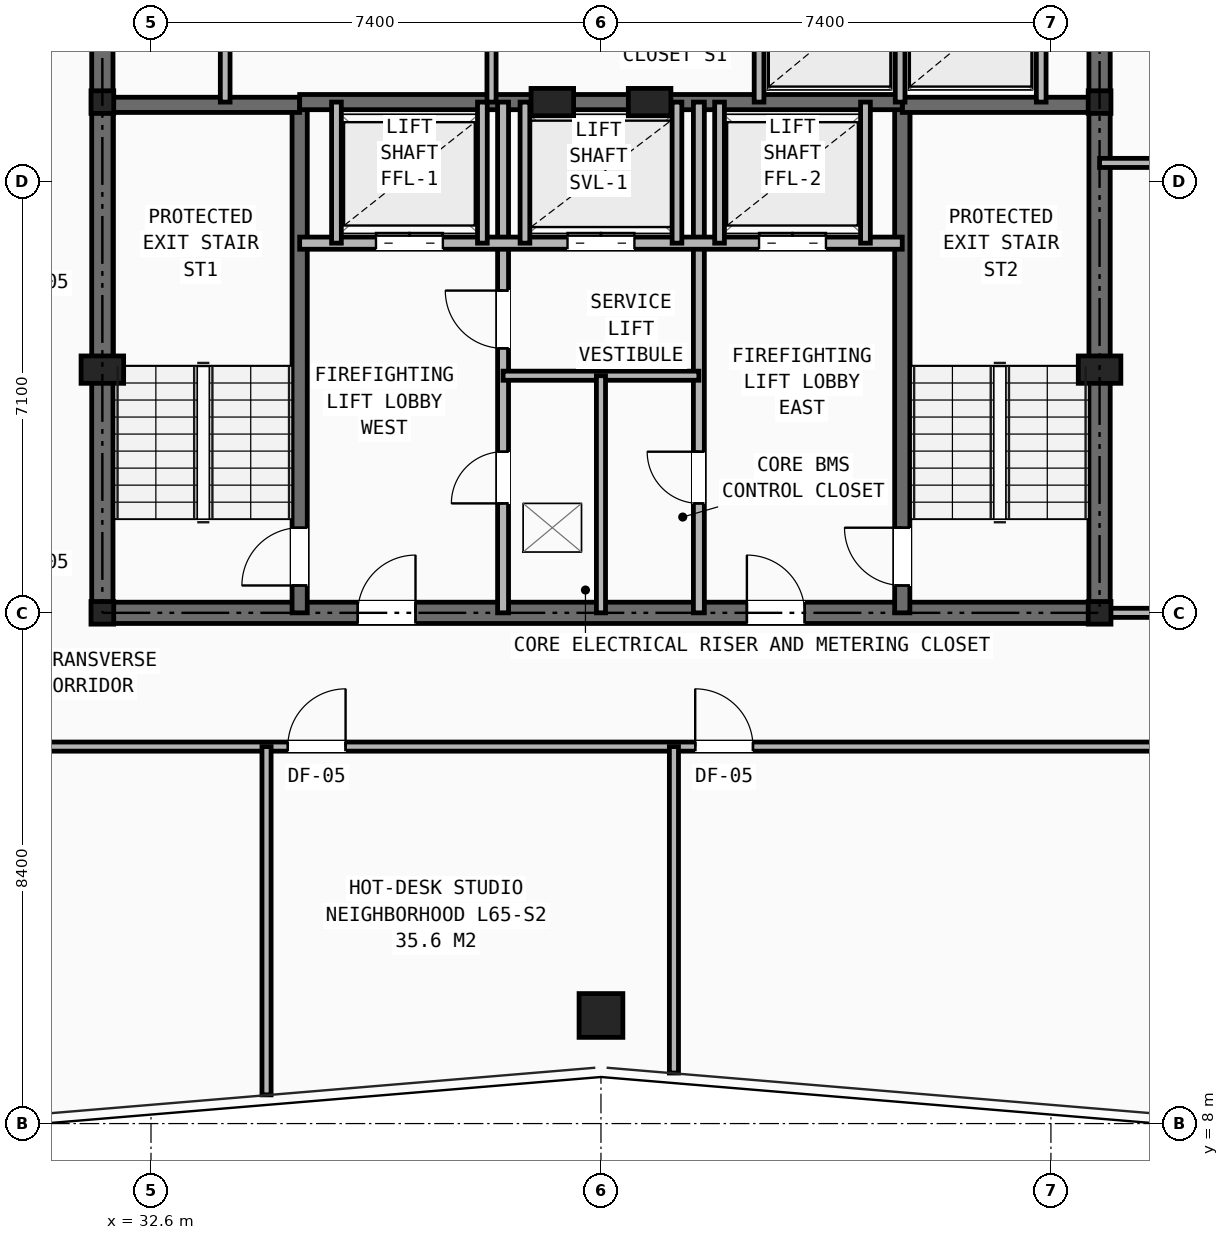
"""IFC4 building model, lengths in metres.
Left out: names, types, materials, properties, quantities, classifications, styles, units other than length and angle.
Written with IfcOpenShell. Run it as: python <this file> out.ifc"""

import sys

from ifc_helpers import new_model, si_unit, direction, frame, frame_2d, origin, origin_2d, place, context, subcontext, project, spatial, rectangle, hollow_rectangle, i_section, extrude, element, fill, save


model = new_model("IFC4")
c1 = context("Model", 3, precision=1e-05, world=origin(), true_north=direction((0.0, 1.0)))
c2 = subcontext(c1, "Body", "Model", "MODEL_VIEW")
j1 = project(units=[si_unit("LENGTHUNIT", "METRE"), si_unit("PLANEANGLEUNIT", "RADIAN")], contexts=[c1])
p1 = place(None, origin())
s1 = spatial("IfcSite", under=j1, at=p1, CompositionType="ELEMENT")
p2 = place(p1, origin())
s2 = spatial("IfcBuilding", under=s1, at=p2, CompositionType="ELEMENT")
p3 = place(p2, frame((0.0, 0.0, 229.4)))
s3 = spatial("IfcBuildingStorey", under=s2, at=p3, CompositionType="ELEMENT", Elevation=229.4)
for number, where, z_axis, x_axis in (
    (1, (31.8, 16.4, 0.0), (0.0, 0.0, 1.0), (1.0, 0.0, 0.0)),
    (2, (48.2, 16.4, 0.0), (0.0, 0.0, 1.0), (1.0, 0.0, 0.0)),
    (3, (31.8, 24.8, 0.0), (0.0, 0.0, 1.0), (1.0, 0.0, 0.0)),
    (4, (48.2, 24.8, 0.0), (0.0, 0.0, 1.0), (1.0, 0.0, 0.0)),
):
    element("IfcColumn", number, at=place(p3, frame(where, z_axis=z_axis, x_axis=x_axis)), inside=s3, PredefinedType="COLUMN", context=c2, shape_type="SweptSolid", body=[
        extrude(i_section(OverallWidth=0.374, OverallDepth=0.372, WebThickness=0.016, FlangeThickness=0.026, at=origin_2d()), origin(), (0.0, 0.0, 1.0), 3.5),
    ])
for number, where, z_axis, x_axis in (
    (5, (31.8, 20.4, 0.0), (0.0, 0.0, 1.0), (1.0, 0.0, 0.0)),
    (6, (48.2, 20.4, 0.0), (0.0, 0.0, 1.0), (1.0, 0.0, 0.0)),
    (7, (39.2, 24.8, 0.0), (0.0, 0.0, 1.0), (1.0, 0.0, 0.0)),
    (8, (40.8, 24.8, 0.0), (0.0, 0.0, 1.0), (1.0, 0.0, 0.0)),
):
    element("IfcColumn", number, at=place(p3, frame(where, z_axis=z_axis, x_axis=x_axis)), inside=s3, PredefinedType="PILASTER", context=c2, shape_type="SweptSolid", body=[
        extrude(rectangle(XDim=0.7, YDim=0.45, at=origin_2d()), origin(), (0.0, 0.0, 1.0), 3.5),
    ])
p4 = place(p3, frame((40.0, 9.778, 0.0), z_axis=(0.0, 0.0, 1.0), x_axis=(1.0, 0.0, 0.0)))
e9 = element("IfcColumn", 9, at=p4, inside=s3, PredefinedType="COLUMN", context=c2, shape_type="SweptSolid", body=[
    extrude(hollow_rectangle(XDim=0.72, YDim=0.72, WallThickness=0.05, at=origin_2d()), origin(), (0.0, 0.0, 1.0), 3.5),
])
p5 = place(p3, frame((31.8, 16.4, 0.0), z_axis=(0.0, 0.0, 1.0), x_axis=(1.0, 0.0, 0.0)))
e10 = element("IfcWall", 10, at=p5, inside=s3, PredefinedType="SHEAR", context=c2, shape_type="SweptSolid", body=[
    extrude(rectangle(XDim=16.4, YDim=0.35, at=frame_2d((8.2, 0.0))), origin(), (0.0, 0.0, 1.0), 3.25),
])
p6 = place(p5, frame((4.2, 0.0, 0.0)))
e11 = element("IfcOpeningElement", 11, at=p6, cuts=e10, PredefinedType="OPENING", context=c2, shape_type="SweptSolid", body=[
    extrude(rectangle(XDim=0.95, YDim=2.1, at=frame_2d((0.475, 1.05))), frame((0.0, 0.185, 0.0), z_axis=(0.0, -1.0, 0.0), x_axis=(1.0, 0.0, 0.0)), (0.0, 0.0, 1.0), 0.37),
])
p7 = place(p5, frame((10.6, 0.0, 0.0)))
e12 = element("IfcOpeningElement", 12, at=p7, cuts=e10, PredefinedType="OPENING", context=c2, shape_type="SweptSolid", body=[
    extrude(rectangle(XDim=0.95, YDim=2.1, at=frame_2d((0.475, 1.05))), frame((0.0, 0.185, 0.0), z_axis=(0.0, -1.0, 0.0), x_axis=(1.0, 0.0, 0.0)), (0.0, 0.0, 1.0), 0.37),
])
p8 = place(p3, frame((31.8, 16.4, 0.0), z_axis=(0.0, 0.0, 1.0), x_axis=(0.0, 1.0, 0.0)))
e13 = element("IfcWall", 13, at=p8, inside=s3, PredefinedType="SHEAR", context=c2, shape_type="SweptSolid", body=[
    extrude(rectangle(XDim=14.8, YDim=0.35, at=frame_2d((7.4, 0.0))), origin(), (0.0, 0.0, 1.0), 3.25),
])
p9 = place(p8, frame((11.0, 0.0, 0.0)))
e14 = element("IfcOpeningElement", 14, at=p9, cuts=e13, PredefinedType="OPENING", context=c2, shape_type="SweptSolid", body=[
    extrude(rectangle(XDim=1.1, YDim=2.15, at=frame_2d((0.55, 1.075))), frame((0.0, 0.185, 0.0), z_axis=(0.0, -1.0, 0.0), x_axis=(1.0, 0.0, 0.0)), (0.0, 0.0, 1.0), 0.37),
])
p10 = place(p3, frame((48.2, 16.4, 0.0), z_axis=(0.0, 0.0, 1.0), x_axis=(0.0, 1.0, 0.0)))
e15 = element("IfcWall", 15, at=p10, inside=s3, PredefinedType="SHEAR", context=c2, shape_type="SweptSolid", body=[
    extrude(rectangle(XDim=14.8, YDim=0.35, at=frame_2d((7.4, 0.0))), origin(), (0.0, 0.0, 1.0), 3.25),
])
p11 = place(p10, frame((11.0, 0.0, 0.0)))
e16 = element("IfcOpeningElement", 16, at=p11, cuts=e15, PredefinedType="OPENING", context=c2, shape_type="SweptSolid", body=[
    extrude(rectangle(XDim=1.1, YDim=2.15, at=frame_2d((0.55, 1.075))), frame((0.0, 0.185, 0.0), z_axis=(0.0, -1.0, 0.0), x_axis=(1.0, 0.0, 0.0)), (0.0, 0.0, 1.0), 0.37),
])
p12 = place(p3, frame((35.045, 16.4, 0.0), z_axis=(0.0, 0.0, 1.0), x_axis=(0.0, 1.0, 0.0)))
e17 = element("IfcWall", 17, at=p12, inside=s3, PredefinedType="SHEAR", context=c2, shape_type="SweptSolid", body=[
    extrude(rectangle(XDim=8.4, YDim=0.25, at=frame_2d((4.2, 0.0))), origin(), (0.0, 0.0, 1.0), 3.25),
])
p13 = place(p12, frame((0.45, 0.0, 0.0)))
e18 = element("IfcOpeningElement", 18, at=p13, cuts=e17, PredefinedType="OPENING", context=c2, shape_type="SweptSolid", body=[
    extrude(rectangle(XDim=0.95, YDim=2.1, at=frame_2d((0.475, 1.05))), frame((0.0, 0.135, 0.0), z_axis=(0.0, -1.0, 0.0), x_axis=(1.0, 0.0, 0.0)), (0.0, 0.0, 1.0), 0.27),
])
p14 = place(p3, frame((31.8, 24.755, 0.0), z_axis=(0.0, 0.0, 1.0), x_axis=(1.0, 0.0, 0.0)))
e19 = element("IfcWall", 19, at=p14, inside=s3, PredefinedType="SHEAR", context=c2, shape_type="SweptSolid", body=[
    extrude(rectangle(XDim=3.245, YDim=0.25, at=frame_2d((1.623, 0.0))), origin(), (0.0, 0.0, 1.0), 3.25),
])
p15 = place(p3, frame((44.955, 16.4, 0.0), z_axis=(0.0, 0.0, 1.0), x_axis=(0.0, 1.0, 0.0)))
e20 = element("IfcWall", 20, at=p15, inside=s3, PredefinedType="SHEAR", context=c2, shape_type="SweptSolid", body=[
    extrude(rectangle(XDim=8.4, YDim=0.25, at=frame_2d((4.2, 0.0))), origin(), (0.0, 0.0, 1.0), 3.25),
])
p16 = place(p15, frame((0.45, 0.0, 0.0)))
e21 = element("IfcOpeningElement", 21, at=p16, cuts=e20, PredefinedType="OPENING", context=c2, shape_type="SweptSolid", body=[
    extrude(rectangle(XDim=0.95, YDim=2.1, at=frame_2d((0.475, 1.05))), frame((0.0, 0.135, 0.0), z_axis=(0.0, -1.0, 0.0), x_axis=(1.0, 0.0, 0.0)), (0.0, 0.0, 1.0), 0.27),
])
p17 = place(p3, frame((44.955, 24.755, 0.0), z_axis=(0.0, 0.0, 1.0), x_axis=(1.0, 0.0, 0.0)))
e22 = element("IfcWall", 22, at=p17, inside=s3, PredefinedType="SHEAR", context=c2, shape_type="SweptSolid", body=[
    extrude(rectangle(XDim=3.245, YDim=0.25, at=frame_2d((1.623, 0.0))), origin(), (0.0, 0.0, 1.0), 3.25),
])
p18 = place(p3, frame((35.045, 24.8, 0.0), z_axis=(0.0, 0.0, 1.0), x_axis=(1.0, 0.0, 0.0)))
e23 = element("IfcWall", 23, at=p18, inside=s3, PredefinedType="SHEAR", context=c2, shape_type="SweptSolid", body=[
    extrude(rectangle(XDim=9.91, YDim=0.25, at=frame_2d((4.955, 0.0))), origin(), (0.0, 0.0, 1.0), 3.25),
])
p19 = place(p3, frame((38.39, 16.4, 0.0), z_axis=(0.0, 0.0, 1.0), x_axis=(0.0, 1.0, 0.0)))
e24 = element("IfcWall", 24, at=p19, inside=s3, PredefinedType="PARTITIONING", context=c2, shape_type="SweptSolid", body=[
    extrude(rectangle(XDim=8.4, YDim=0.18, at=frame_2d((4.2, 0.0))), origin(), (0.0, 0.0, 1.0), 2.978),
])
p20 = place(p19, frame((1.8, 0.0, 0.0)))
e25 = element("IfcOpeningElement", 25, at=p20, cuts=e24, PredefinedType="OPENING", context=c2, shape_type="SweptSolid", body=[
    extrude(rectangle(XDim=0.85, YDim=2.05, at=frame_2d((0.425, 1.025))), frame((0.0, 0.1, 0.0), z_axis=(0.0, -1.0, 0.0), x_axis=(1.0, 0.0, 0.0)), (0.0, 0.0, 1.0), 0.2),
])
p21 = place(p19, frame((4.35, 0.0, 0.0)))
e26 = element("IfcOpeningElement", 26, at=p21, cuts=e24, PredefinedType="OPENING", context=c2, shape_type="SweptSolid", body=[
    extrude(rectangle(XDim=0.95, YDim=2.1, at=frame_2d((0.475, 1.05))), frame((0.0, 0.1, 0.0), z_axis=(0.0, -1.0, 0.0), x_axis=(1.0, 0.0, 0.0)), (0.0, 0.0, 1.0), 0.2),
])
p22 = place(p3, frame((41.61, 16.4, 0.0), z_axis=(0.0, 0.0, 1.0), x_axis=(0.0, 1.0, 0.0)))
e27 = element("IfcWall", 27, at=p22, inside=s3, PredefinedType="PARTITIONING", context=c2, shape_type="SweptSolid", body=[
    extrude(rectangle(XDim=8.4, YDim=0.18, at=frame_2d((4.2, 0.0))), origin(), (0.0, 0.0, 1.0), 2.978),
])
p23 = place(p22, frame((1.8, 0.0, 0.0)))
e28 = element("IfcOpeningElement", 28, at=p23, cuts=e27, PredefinedType="OPENING", context=c2, shape_type="SweptSolid", body=[
    extrude(rectangle(XDim=0.85, YDim=2.05, at=frame_2d((0.425, 1.025))), frame((0.0, 0.1, 0.0), z_axis=(0.0, -1.0, 0.0), x_axis=(1.0, 0.0, 0.0)), (0.0, 0.0, 1.0), 0.2),
])
p24 = place(p3, frame((35.045, 22.48, 0.0), z_axis=(0.0, 0.0, 1.0), x_axis=(1.0, 0.0, 0.0)))
e29 = element("IfcWall", 29, at=p24, inside=s3, PredefinedType="SOLIDWALL", context=c2, shape_type="SweptSolid", body=[
    extrude(rectangle(XDim=9.91, YDim=0.2, at=frame_2d((4.955, 0.0))), origin(), (0.0, 0.0, 1.0), 3.25),
])
p25 = place(p24, frame((1.255, 0.0, 0.0)))
e30 = element("IfcOpeningElement", 30, at=p25, cuts=e29, PredefinedType="OPENING", context=c2, shape_type="SweptSolid", body=[
    extrude(rectangle(XDim=1.1, YDim=2.15, at=frame_2d((0.55, 1.075))), frame((0.0, 0.11, 0.0), z_axis=(0.0, -1.0, 0.0), x_axis=(1.0, 0.0, 0.0)), (0.0, 0.0, 1.0), 0.22),
])
p26 = place(p24, frame((7.555, 0.0, 0.0)))
e31 = element("IfcOpeningElement", 31, at=p26, cuts=e29, PredefinedType="OPENING", context=c2, shape_type="SweptSolid", body=[
    extrude(rectangle(XDim=1.1, YDim=2.15, at=frame_2d((0.55, 1.075))), frame((0.0, 0.11, 0.0), z_axis=(0.0, -1.0, 0.0), x_axis=(1.0, 0.0, 0.0)), (0.0, 0.0, 1.0), 0.22),
])
p27 = place(p24, frame((4.405, 0.0, 0.0)))
e32 = element("IfcOpeningElement", 32, at=p27, cuts=e29, PredefinedType="OPENING", context=c2, shape_type="SweptSolid", body=[
    extrude(rectangle(XDim=1.1, YDim=2.15, at=frame_2d((0.55, 1.075))), frame((0.0, 0.11, 0.0), z_axis=(0.0, -1.0, 0.0), x_axis=(1.0, 0.0, 0.0)), (0.0, 0.0, 1.0), 0.22),
])
p28 = place(p3, frame((38.39, 20.3, 0.0), z_axis=(0.0, 0.0, 1.0), x_axis=(1.0, 0.0, 0.0)))
e33 = element("IfcWall", 33, at=p28, inside=s3, PredefinedType="PARTITIONING", context=c2, shape_type="SweptSolid", body=[
    extrude(rectangle(XDim=3.22, YDim=0.15, at=frame_2d((1.61, 0.0))), origin(), (0.0, 0.0, 1.0), 3.25),
])
p29 = place(p3, frame((40.0, 16.4, 0.0), z_axis=(0.0, 0.0, 1.0), x_axis=(0.0, 1.0, 0.0)))
e34 = element("IfcWall", 34, at=p29, inside=s3, PredefinedType="PARTITIONING", context=c2, shape_type="SweptSolid", body=[
    extrude(rectangle(XDim=3.9, YDim=0.15, at=frame_2d((1.95, 0.0))), origin(), (0.0, 0.0, 1.0), 2.978),
])
for number, where, z_axis, x_axis in (
    (35, (35.65, 22.48, 0.0), (0.0, 0.0, 1.0), (0.0, 1.0, 0.0)),
    (36, (38.05, 22.48, 0.0), (0.0, 0.0, 1.0), (0.0, 1.0, 0.0)),
    (37, (41.95, 22.48, 0.0), (0.0, 0.0, 1.0), (0.0, 1.0, 0.0)),
    (38, (44.35, 22.48, 0.0), (0.0, 0.0, 1.0), (0.0, 1.0, 0.0)),
    (39, (38.75, 22.48, 0.0), (0.0, 0.0, 1.0), (0.0, 1.0, 0.0)),
    (40, (41.25, 22.48, 0.0), (0.0, 0.0, 1.0), (0.0, 1.0, 0.0)),
):
    element("IfcWall", number, at=place(p3, frame(where, z_axis=z_axis, x_axis=x_axis)), inside=s3, PredefinedType="SOLIDWALL", context=c2, shape_type="SweptSolid", body=[
        extrude(rectangle(XDim=2.32, YDim=0.16, at=frame_2d((1.16, 0.0))), origin(), (0.0, 0.0, 1.0), 3.25),
    ])
p30 = place(p3, frame((33.82, 24.8, 0.0), z_axis=(0.0, 0.0, 1.0), x_axis=(0.0, 1.0, 0.0)))
e41 = element("IfcWall", 41, at=p30, inside=s3, PredefinedType="SOLIDWALL", context=c2, shape_type="SweptSolid", body=[
    extrude(rectangle(XDim=2.08, YDim=0.16, at=frame_2d((1.04, 0.0))), origin(), (0.0, 0.0, 1.0), 3.25),
])
p31 = place(p3, frame((38.2, 24.8, 0.0), z_axis=(0.0, 0.0, 1.0), x_axis=(0.0, 1.0, 0.0)))
e42 = element("IfcWall", 42, at=p31, inside=s3, PredefinedType="PARTITIONING", context=c2, shape_type="SweptSolid", body=[
    extrude(rectangle(XDim=2.08, YDim=0.15, at=frame_2d((1.04, 0.0))), origin(), (0.0, 0.0, 1.0), 3.25),
])
for number, where, z_axis, x_axis in (
    (43, (42.6, 24.8, 0.0), (0.0, 0.0, 1.0), (0.0, 1.0, 0.0)),
    (44, (44.92, 24.8, 0.0), (0.0, 0.0, 1.0), (0.0, 1.0, 0.0)),
    (45, (47.24, 24.8, 0.0), (0.0, 0.0, 1.0), (0.0, 1.0, 0.0)),
):
    element("IfcWall", number, at=place(p3, frame(where, z_axis=z_axis, x_axis=x_axis)), inside=s3, PredefinedType="SOLIDWALL", context=c2, shape_type="SweptSolid", body=[
        extrude(rectangle(XDim=2.08, YDim=0.16, at=frame_2d((1.04, 0.0))), origin(), (0.0, 0.0, 1.0), 3.25),
    ])
p32 = place(p3, frame((48.2, 16.4, 0.0), z_axis=(0.0, 0.0, 1.0), x_axis=(1.0, 0.0, 0.0)))
e46 = element("IfcWall", 46, at=p32, inside=s3, PredefinedType="PARTITIONING", context=c2, shape_type="SweptSolid", body=[
    extrude(rectangle(XDim=15.74, YDim=0.15, at=frame_2d((7.87, 0.0))), origin(), (0.0, 0.0, 1.0), 2.292),
])
p33 = place(p3, frame((25.5, 14.2, 0.0), z_axis=(0.0, 0.0, 1.0), x_axis=(1.0, 0.0, 0.0)))
e47 = element("IfcWall", 47, at=p33, inside=s3, PredefinedType="PARTITIONING", context=c2, shape_type="SweptSolid", body=[
    extrude(rectangle(XDim=29.0, YDim=0.15, at=frame_2d((14.5, 0.0))), origin(), (0.0, 0.0, 1.0), 2.292),
])
p34 = place(p33, frame((0.85, 0.0, 0.0)))
e48 = element("IfcOpeningElement", 48, at=p34, cuts=e47, PredefinedType="OPENING", context=c2, shape_type="SweptSolid", body=[
    extrude(rectangle(XDim=0.95, YDim=2.1, at=frame_2d((0.475, 1.05))), frame((0.0, 0.085, 0.0), z_axis=(0.0, -1.0, 0.0), x_axis=(1.0, 0.0, 0.0)), (0.0, 0.0, 1.0), 0.17),
])
p35 = place(p33, frame((9.35, 0.0, 0.0)))
e49 = element("IfcOpeningElement", 49, at=p35, cuts=e47, PredefinedType="OPENING", context=c2, shape_type="SweptSolid", body=[
    extrude(rectangle(XDim=0.95, YDim=2.1, at=frame_2d((0.475, 1.05))), frame((0.0, 0.085, 0.0), z_axis=(0.0, -1.0, 0.0), x_axis=(1.0, 0.0, 0.0)), (0.0, 0.0, 1.0), 0.17),
])
p36 = place(p33, frame((16.05, 0.0, 0.0)))
e50 = element("IfcOpeningElement", 50, at=p36, cuts=e47, PredefinedType="OPENING", context=c2, shape_type="SweptSolid", body=[
    extrude(rectangle(XDim=0.95, YDim=2.1, at=frame_2d((0.475, 1.05))), frame((0.0, 0.085, 0.0), z_axis=(0.0, -1.0, 0.0), x_axis=(1.0, 0.0, 0.0)), (0.0, 0.0, 1.0), 0.17),
])
p37 = place(p3, frame((34.5, 8.472, 0.0), z_axis=(0.0, 0.0, 1.0), x_axis=(0.0, 1.0, 0.0)))
e51 = element("IfcWall", 51, at=p37, inside=s3, PredefinedType="PARTITIONING", context=c2, shape_type="SweptSolid", body=[
    extrude(rectangle(XDim=5.728, YDim=0.15, at=frame_2d((2.864, 0.0))), origin(), (0.0, 0.0, 1.0), 2.292),
])
p38 = place(p3, frame((41.2, 8.831, 0.0), z_axis=(0.0, 0.0, 1.0), x_axis=(0.0, 1.0, 0.0)))
e52 = element("IfcWall", 52, at=p38, inside=s3, PredefinedType="PARTITIONING", context=c2, shape_type="SweptSolid", body=[
    extrude(rectangle(XDim=5.369, YDim=0.15, at=frame_2d((2.684, 0.0))), origin(), (0.0, 0.0, 1.0), 2.628),
])
p39 = place(p3, frame((48.2, 23.8, 0.0), z_axis=(0.0, 0.0, 1.0), x_axis=(1.0, 0.0, 0.0)))
e53 = element("IfcWall", 53, at=p39, inside=s3, PredefinedType="PARTITIONING", context=c2, shape_type="SweptSolid", body=[
    extrude(rectangle(XDim=10.602, YDim=0.15, at=frame_2d((5.301, 0.0))), origin(), (0.0, 0.0, 1.0), 2.628),
])
p40 = place(p39, frame((1.4, 0.0, 0.0)))
e54 = element("IfcOpeningElement", 54, at=p40, cuts=e53, PredefinedType="OPENING", context=c2, shape_type="SweptSolid", body=[
    extrude(rectangle(XDim=0.95, YDim=2.1, at=frame_2d((0.475, 1.05))), frame((0.0, 0.085, 0.0), z_axis=(0.0, -1.0, 0.0), x_axis=(1.0, 0.0, 0.0)), (0.0, 0.0, 1.0), 0.17),
])
p41 = place(p20, origin())
e55 = element("IfcDoor", 55, at=p41, inside=s3, OperationType="SINGLE_SWING_LEFT", PredefinedType="DOOR", context=c2, shape_type="SweptSolid", body=[
    extrude(rectangle(XDim=0.85, YDim=2.05, at=frame_2d((0.425, 1.025))), frame((0.0, 0.025, 0.0), z_axis=(0.0, -1.0, 0.0), x_axis=(1.0, 0.0, 0.0)), (0.0, 0.0, 1.0), 0.05),
])
fill(e25, e55)
p42 = place(p23, origin())
e56 = element("IfcDoor", 56, at=p42, inside=s3, OperationType="SINGLE_SWING_RIGHT", PredefinedType="DOOR", context=c2, shape_type="SweptSolid", body=[
    extrude(rectangle(XDim=0.85, YDim=2.05, at=frame_2d((0.425, 1.025))), frame((0.0, 0.025, 0.0), z_axis=(0.0, -1.0, 0.0), x_axis=(1.0, 0.0, 0.0)), (0.0, 0.0, 1.0), 0.05),
])
fill(e28, e56)
p43 = place(p21, origin())
e57 = element("IfcDoor", 57, at=p43, inside=s3, OperationType="SINGLE_SWING_RIGHT", PredefinedType="DOOR", context=c2, shape_type="SweptSolid", body=[
    extrude(rectangle(XDim=0.95, YDim=2.1, at=frame_2d((0.475, 1.05))), frame((0.0, 0.025, 0.0), z_axis=(0.0, -1.0, 0.0), x_axis=(1.0, 0.0, 0.0)), (0.0, 0.0, 1.0), 0.05),
])
fill(e26, e57)
p44 = place(p13, origin())
e58 = element("IfcDoor", 58, at=p44, inside=s3, OperationType="SINGLE_SWING_LEFT", PredefinedType="DOOR", context=c2, shape_type="SweptSolid", body=[
    extrude(rectangle(XDim=0.95, YDim=2.1, at=frame_2d((0.475, 1.05))), frame((0.0, 0.025, 0.0), z_axis=(0.0, -1.0, 0.0), x_axis=(1.0, 0.0, 0.0)), (0.0, 0.0, 1.0), 0.05),
])
fill(e18, e58)
p45 = place(p16, origin())
e59 = element("IfcDoor", 59, at=p45, inside=s3, OperationType="SINGLE_SWING_RIGHT", PredefinedType="DOOR", context=c2, shape_type="SweptSolid", body=[
    extrude(rectangle(XDim=0.95, YDim=2.1, at=frame_2d((0.475, 1.05))), frame((0.0, 0.025, 0.0), z_axis=(0.0, -1.0, 0.0), x_axis=(1.0, 0.0, 0.0)), (0.0, 0.0, 1.0), 0.05),
])
fill(e21, e59)
p46 = place(p6, origin())
e60 = element("IfcDoor", 60, at=p46, inside=s3, OperationType="SINGLE_SWING_RIGHT", PredefinedType="DOOR", context=c2, shape_type="SweptSolid", body=[
    extrude(rectangle(XDim=0.95, YDim=2.1, at=frame_2d((0.475, 1.05))), frame((0.0, 0.025, 0.0), z_axis=(0.0, -1.0, 0.0), x_axis=(1.0, 0.0, 0.0)), (0.0, 0.0, 1.0), 0.05),
])
fill(e11, e60)
p47 = place(p7, origin())
e61 = element("IfcDoor", 61, at=p47, inside=s3, OperationType="SINGLE_SWING_LEFT", PredefinedType="DOOR", context=c2, shape_type="SweptSolid", body=[
    extrude(rectangle(XDim=0.95, YDim=2.1, at=frame_2d((0.475, 1.05))), frame((0.0, 0.025, 0.0), z_axis=(0.0, -1.0, 0.0), x_axis=(1.0, 0.0, 0.0)), (0.0, 0.0, 1.0), 0.05),
])
fill(e12, e61)
p48 = place(p25, origin())
e62 = element("IfcDoor", 62, at=p48, inside=s3, OperationType="DOUBLE_DOOR_SLIDING", PredefinedType="DOOR", context=c2, shape_type="SweptSolid", body=[
    extrude(rectangle(XDim=1.1, YDim=2.15, at=frame_2d((0.55, 1.075))), frame((0.0, 0.025, 0.0), z_axis=(0.0, -1.0, 0.0), x_axis=(1.0, 0.0, 0.0)), (0.0, 0.0, 1.0), 0.05),
])
fill(e30, e62)
p49 = place(p26, origin())
e63 = element("IfcDoor", 63, at=p49, inside=s3, OperationType="DOUBLE_DOOR_SLIDING", PredefinedType="DOOR", context=c2, shape_type="SweptSolid", body=[
    extrude(rectangle(XDim=1.1, YDim=2.15, at=frame_2d((0.55, 1.075))), frame((0.0, 0.025, 0.0), z_axis=(0.0, -1.0, 0.0), x_axis=(1.0, 0.0, 0.0)), (0.0, 0.0, 1.0), 0.05),
])
fill(e31, e63)
p50 = place(p27, origin())
e64 = element("IfcDoor", 64, at=p50, inside=s3, OperationType="DOUBLE_DOOR_SLIDING", PredefinedType="DOOR", context=c2, shape_type="SweptSolid", body=[
    extrude(rectangle(XDim=1.1, YDim=2.15, at=frame_2d((0.55, 1.075))), frame((0.0, 0.025, 0.0), z_axis=(0.0, -1.0, 0.0), x_axis=(1.0, 0.0, 0.0)), (0.0, 0.0, 1.0), 0.05),
])
fill(e32, e64)
p51 = place(p35, origin())
e65 = element("IfcDoor", 65, at=p51, inside=s3, OperationType="SINGLE_SWING_RIGHT", PredefinedType="DOOR", context=c2, shape_type="SweptSolid", body=[
    extrude(rectangle(XDim=0.95, YDim=2.1, at=frame_2d((0.475, 1.05))), frame((0.0, 0.025, 0.0), z_axis=(0.0, -1.0, 0.0), x_axis=(1.0, 0.0, 0.0)), (0.0, 0.0, 1.0), 0.05),
])
fill(e49, e65)
p52 = place(p36, origin())
e66 = element("IfcDoor", 66, at=p52, inside=s3, OperationType="SINGLE_SWING_LEFT", PredefinedType="DOOR", context=c2, shape_type="SweptSolid", body=[
    extrude(rectangle(XDim=0.95, YDim=2.1, at=frame_2d((0.475, 1.05))), frame((0.0, 0.025, 0.0), z_axis=(0.0, -1.0, 0.0), x_axis=(1.0, 0.0, 0.0)), (0.0, 0.0, 1.0), 0.05),
])
fill(e50, e66)
save(model, sys.argv[1])
